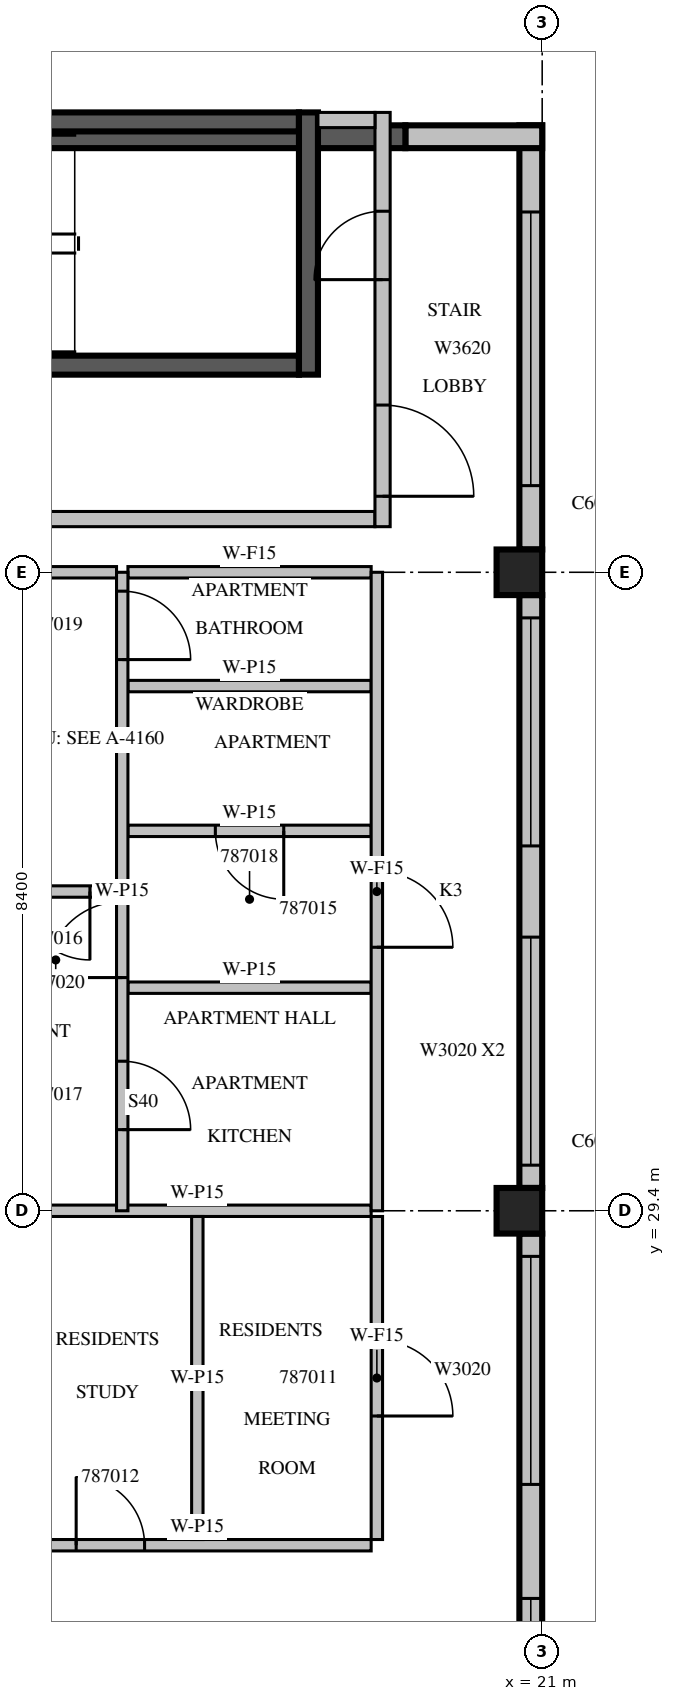
"""IFC4 building model, lengths in metres.
Left out: names, types, materials, properties, quantities, classifications, styles, units other than length and angle.
Written with IfcOpenShell. Run it as: python <this file> out.ifc"""

import sys

from ifc_helpers import new_model, si_unit, direction, frame, frame_2d, origin, origin_2d, place, context, subcontext, project, spatial, rectangle, extrude, source, transform, mapped, element, fill, save


model = new_model("IFC4")
c1 = context("Model", 3, precision=1e-05, world=origin(), true_north=direction((0.0, 1.0)))
c2 = subcontext(c1, "Body", "Model", "MODEL_VIEW")
j1 = project(units=[si_unit("LENGTHUNIT", "METRE"), si_unit("PLANEANGLEUNIT", "RADIAN")], contexts=[c1])
p1 = place(None, origin())
s1 = spatial("IfcSite", under=j1, at=p1, CompositionType="ELEMENT")
p2 = place(p1, origin())
s2 = spatial("IfcBuilding", under=s1, at=p2, CompositionType="ELEMENT")
p3 = place(p2, frame((0.0, 0.0, 365.0)))
s3 = spatial("IfcBuildingStorey", under=s2, at=p3, CompositionType="ELEMENT", Elevation=365.0)
m1 = source(origin(), c2, "Body", "SweptSolid", [
    extrude(rectangle(XDim=0.6, YDim=0.6, at=origin_2d()), origin(), (0.0, 0.0, 1.0), 3.5),
])
for number, where, z_axis, x_axis in (
    (1, (20.7, 29.4, 0.0), (0.0, 0.0, 1.0), (1.0, 0.0, 0.0)),
    (2, (20.7, 37.8, 0.0), (0.0, 0.0, 1.0), (1.0, 0.0, 0.0)),
):
    element("IfcColumn", number, at=place(p3, frame(where, z_axis=z_axis, x_axis=x_axis)), inside=s3, PredefinedType="COLUMN", context=c2, shape_type="MappedRepresentation", body=[
        mapped(m1, transform((0.0, 0.0, 0.0), scale=1.0)),
    ])
m2 = source(origin(), c2, "Body", "SweptSolid", [
    extrude(rectangle(XDim=7.5, YDim=0.3, at=frame_2d((3.75, 0.0))), origin(), (0.0, 0.0, 1.0), 3.05),
])
p4 = place(p3, frame((20.85, 21.6, 0.0), z_axis=(0.0, 0.0, 1.0), x_axis=(0.0, 1.0, 0.0)))
e3 = element("IfcWall", 3, at=p4, inside=s3, PredefinedType="STANDARD", context=c2, shape_type="MappedRepresentation", body=[
    mapped(m2, transform((0.0, 0.0, 0.0), scale=1.0)),
])
m3 = source(origin(), c2, "Body", "SweptSolid", [
    extrude(rectangle(XDim=2.4, YDim=2.0, at=frame_2d((1.2, 1.0))), frame((0.0, 0.16, 0.0), z_axis=(0.0, -1.0, 0.0), x_axis=(1.0, 0.0, 0.0)), (0.0, 0.0, 1.0), 0.32),
])
p5 = place(p4, frame((0.3, 0.0, 0.6)))
e4 = element("IfcOpeningElement", 4, at=p5, cuts=e3, PredefinedType="OPENING", context=c2, shape_type="MappedRepresentation", body=[
    mapped(m3, transform((0.0, 0.0, 0.0), scale=1.0)),
])
m4 = source(origin(), c2, "Body", "SweptSolid", [
    extrude(rectangle(XDim=3.0, YDim=2.0, at=frame_2d((1.5, 1.0))), frame((0.0, 0.16, 0.0), z_axis=(0.0, -1.0, 0.0), x_axis=(1.0, 0.0, 0.0)), (0.0, 0.0, 1.0), 0.32),
])
p6 = place(p4, frame((4.2, 0.0, 0.6)))
e5 = element("IfcOpeningElement", 5, at=p6, cuts=e3, PredefinedType="OPENING", context=c2, shape_type="MappedRepresentation", body=[
    mapped(m4, transform((0.0, 0.0, 0.0), scale=1.0)),
])
m5 = source(origin(), c2, "Body", "SweptSolid", [
    extrude(rectangle(XDim=7.8, YDim=0.3, at=frame_2d((3.9, 0.0))), origin(), (0.0, 0.0, 1.0), 3.05),
])
p7 = place(p3, frame((20.85, 29.7, 0.0), z_axis=(0.0, 0.0, 1.0), x_axis=(0.0, 1.0, 0.0)))
e6 = element("IfcWall", 6, at=p7, inside=s3, PredefinedType="STANDARD", context=c2, shape_type="MappedRepresentation", body=[
    mapped(m5, transform((0.0, 0.0, 0.0), scale=1.0)),
])
p8 = place(p7, frame((0.3, 0.0, 0.6)))
e7 = element("IfcOpeningElement", 7, at=p8, cuts=e6, PredefinedType="OPENING", context=c2, shape_type="MappedRepresentation", body=[
    mapped(m4, transform((0.0, 0.0, 0.0), scale=1.0)),
])
p9 = place(p7, frame((4.5, 0.0, 0.6)))
e8 = element("IfcOpeningElement", 8, at=p9, cuts=e6, PredefinedType="OPENING", context=c2, shape_type="MappedRepresentation", body=[
    mapped(m4, transform((0.0, 0.0, 0.0), scale=1.0)),
])
p10 = place(p3, frame((20.85, 38.1, 0.0), z_axis=(0.0, 0.0, 1.0), x_axis=(0.0, 1.0, 0.0)))
e9 = element("IfcWall", 9, at=p10, inside=s3, PredefinedType="STANDARD", context=c2, shape_type="SweptSolid", body=[
    extrude(rectangle(XDim=5.58, YDim=0.3, at=frame_2d((2.79, 0.0))), origin(), (0.0, 0.0, 1.0), 3.05),
])
m6 = source(origin(), c2, "Body", "SweptSolid", [
    extrude(rectangle(XDim=3.6, YDim=2.0, at=frame_2d((1.8, 1.0))), frame((0.0, 0.16, 0.0), z_axis=(0.0, -1.0, 0.0), x_axis=(1.0, 0.0, 0.0)), (0.0, 0.0, 1.0), 0.32),
])
p11 = place(p10, frame((0.84, 0.0, 0.6)))
e10 = element("IfcOpeningElement", 10, at=p11, cuts=e9, PredefinedType="OPENING", context=c2, shape_type="MappedRepresentation", body=[
    mapped(m6, transform((0.0, 0.0, 0.0), scale=1.0)),
])
p12 = place(p3, frame((21.0, 43.53, 0.0), z_axis=(0.0, 0.0, 1.0), x_axis=(-1.0, 0.0, 0.0)))
e11 = element("IfcWall", 11, at=p12, inside=s3, PredefinedType="STANDARD", context=c2, shape_type="SweptSolid", body=[
    extrude(rectangle(XDim=1.8, YDim=0.3, at=frame_2d((0.9, 0.0))), origin(), (0.0, 0.0, 1.0), 3.05),
])
p13 = place(p3, frame((19.2, 43.53, 0.0), z_axis=(0.0, 0.0, 1.0), x_axis=(-1.0, 0.0, 0.0)))
e12 = element("IfcWall", 12, at=p13, inside=s3, PredefinedType="SOLIDWALL", context=c2, shape_type="SweptSolid", body=[
    extrude(rectangle(XDim=8.6, YDim=0.3, at=frame_2d((4.3, 0.0))), origin(), (0.0, 0.0, 1.0), 3.05),
])
m7 = source(origin(), c2, "Body", "SweptSolid", [
    extrude(rectangle(XDim=7.0, YDim=0.25, at=frame_2d((3.5, 0.0))), origin(), (0.0, 0.0, 1.0), 3.05),
])
p14 = place(p3, frame((10.8, 40.525, 0.0), z_axis=(0.0, 0.0, 1.0), x_axis=(1.0, 0.0, 0.0)))
e13 = element("IfcWall", 13, at=p14, inside=s3, PredefinedType="SOLIDWALL", context=c2, shape_type="MappedRepresentation", body=[
    mapped(m7, transform((0.0, 0.0, 0.0), scale=1.0)),
])
m8 = source(origin(), c2, "Body", "SweptSolid", [
    extrude(rectangle(XDim=1.1, YDim=2.1, at=frame_2d((0.55, 1.05))), frame((0.0, 0.135, 0.0), z_axis=(0.0, -1.0, 0.0), x_axis=(1.0, 0.0, 0.0)), (0.0, 0.0, 1.0), 0.27),
])
p15 = place(p14, frame((0.55, 0.0, 0.0)))
e14 = element("IfcOpeningElement", 14, at=p15, cuts=e13, PredefinedType="OPENING", context=c2, shape_type="MappedRepresentation", body=[
    mapped(m8, transform((0.0, 0.0, 0.0), scale=1.0)),
])
p16 = place(p3, frame((10.8, 43.725, 0.0), z_axis=(0.0, 0.0, 1.0), x_axis=(1.0, 0.0, 0.0)))
e15 = element("IfcWall", 15, at=p16, inside=s3, PredefinedType="SOLIDWALL", context=c2, shape_type="MappedRepresentation", body=[
    mapped(m7, transform((0.0, 0.0, 0.0), scale=1.0)),
])
m9 = source(origin(), c2, "Body", "SweptSolid", [
    extrude(rectangle(XDim=3.45, YDim=0.25, at=frame_2d((1.725, 0.0))), origin(), (0.0, 0.0, 1.0), 3.05),
])
p17 = place(p3, frame((17.925, 40.4, 0.0), z_axis=(0.0, 0.0, 1.0), x_axis=(0.0, 1.0, 0.0)))
e16 = element("IfcWall", 16, at=p17, inside=s3, PredefinedType="SOLIDWALL", context=c2, shape_type="MappedRepresentation", body=[
    mapped(m9, transform((0.0, 0.0, 0.0), scale=1.0)),
])
m10 = source(origin(), c2, "Body", "SweptSolid", [
    extrude(rectangle(XDim=8.0, YDim=0.2, at=frame_2d((4.0, 0.0))), origin(), (0.0, 0.0, 1.0), 3.05),
])
p18 = place(p3, frame((10.8, 38.5, 0.0), z_axis=(0.0, 0.0, 1.0), x_axis=(1.0, 0.0, 0.0)))
e17 = element("IfcWall", 17, at=p18, inside=s3, PredefinedType="PARTITIONING", context=c2, shape_type="MappedRepresentation", body=[
    mapped(m10, transform((0.0, 0.0, 0.0), scale=1.0)),
])
m11 = source(origin(), c2, "Body", "SweptSolid", [
    extrude(rectangle(XDim=5.45, YDim=0.2, at=frame_2d((2.725, 0.0))), origin(), (0.0, 0.0, 1.0), 3.05),
])
p19 = place(p3, frame((18.9, 38.4, 0.0), z_axis=(0.0, 0.0, 1.0), x_axis=(0.0, 1.0, 0.0)))
e18 = element("IfcWall", 18, at=p19, inside=s3, PredefinedType="PARTITIONING", context=c2, shape_type="MappedRepresentation", body=[
    mapped(m11, transform((0.0, 0.0, 0.0), scale=1.0)),
])
m12 = source(origin(), c2, "Body", "SweptSolid", [
    extrude(rectangle(XDim=1.2, YDim=2.1, at=frame_2d((0.6, 1.05))), frame((0.0, 0.11, 0.0), z_axis=(0.0, -1.0, 0.0), x_axis=(1.0, 0.0, 0.0)), (0.0, 0.0, 1.0), 0.22),
])
p20 = place(p19, frame((0.4, 0.0, 0.0)))
e19 = element("IfcOpeningElement", 19, at=p20, cuts=e18, PredefinedType="OPENING", context=c2, shape_type="MappedRepresentation", body=[
    mapped(m12, transform((0.0, 0.0, 0.0), scale=1.0)),
])
m13 = source(origin(), c2, "Body", "SweptSolid", [
    extrude(rectangle(XDim=0.9, YDim=2.1, at=frame_2d((0.45, 1.05))), frame((0.0, 0.11, 0.0), z_axis=(0.0, -1.0, 0.0), x_axis=(1.0, 0.0, 0.0)), (0.0, 0.0, 1.0), 0.22),
])
p21 = place(p19, frame((3.25, 0.0, 0.0)))
e20 = element("IfcOpeningElement", 20, at=p21, cuts=e18, PredefinedType="OPENING", context=c2, shape_type="MappedRepresentation", body=[
    mapped(m13, transform((0.0, 0.0, 0.0), scale=1.0)),
])
m14 = source(origin(), c2, "Body", "SweptSolid", [
    extrude(rectangle(XDim=0.75, YDim=0.2, at=frame_2d((0.375, 0.0))), origin(), (0.0, 0.0, 1.0), 3.05),
])
p22 = place(p3, frame((18.05, 43.75, 0.0), z_axis=(0.0, 0.0, 1.0), x_axis=(1.0, 0.0, 0.0)))
e21 = element("IfcWall", 21, at=p22, inside=s3, PredefinedType="PARTITIONING", context=c2, shape_type="MappedRepresentation", body=[
    mapped(m14, transform((0.0, 0.0, 0.0), scale=1.0)),
])
m15 = source(origin(), c2, "Body", "SweptSolid", [
    extrude(rectangle(XDim=4.575, YDim=0.15, at=frame_2d((2.288, 0.0))), origin(), (0.0, 0.0, 1.0), 3.05),
])
p23 = place(p3, frame((14.175, 25.0, 0.0), z_axis=(0.0, 0.0, 1.0), x_axis=(1.0, 0.0, 0.0)))
e22 = element("IfcWall", 22, at=p23, inside=s3, PredefinedType="PARTITIONING", context=c2, shape_type="MappedRepresentation", body=[
    mapped(m15, transform((0.0, 0.0, 0.0), scale=1.0)),
])
m16 = source(origin(), c2, "Body", "SweptSolid", [
    extrude(rectangle(XDim=0.9, YDim=2.1, at=frame_2d((0.45, 1.05))), frame((0.0, 0.085, 0.0), z_axis=(0.0, -1.0, 0.0), x_axis=(1.0, 0.0, 0.0)), (0.0, 0.0, 1.0), 0.17),
])
p24 = place(p23, frame((0.694, 0.0, 0.0)))
e23 = element("IfcOpeningElement", 23, at=p24, cuts=e22, PredefinedType="OPENING", context=c2, shape_type="MappedRepresentation", body=[
    mapped(m16, transform((0.0, 0.0, 0.0), scale=1.0)),
])
p25 = place(p3, frame((18.75, 29.4, 0.0), z_axis=(0.0, 0.0, 1.0), x_axis=(-1.0, 0.0, 0.0)))
e24 = element("IfcWall", 24, at=p25, inside=s3, PredefinedType="PARTITIONING", context=c2, shape_type="MappedRepresentation", body=[
    mapped(m15, transform((0.0, 0.0, 0.0), scale=1.0)),
])
m17 = source(origin(), c2, "Body", "SweptSolid", [
    extrude(rectangle(XDim=4.25, YDim=0.15, at=frame_2d((2.125, 0.0))), origin(), (0.0, 0.0, 1.0), 3.05),
])
p26 = place(p3, frame((18.825, 25.075, 0.0), z_axis=(0.0, 0.0, 1.0), x_axis=(0.0, 1.0, 0.0)))
e25 = element("IfcWall", 25, at=p26, inside=s3, PredefinedType="PARTITIONING", context=c2, shape_type="MappedRepresentation", body=[
    mapped(m17, transform((0.0, 0.0, 0.0), scale=1.0)),
])
m18 = source(origin(), c2, "Body", "SweptSolid", [
    extrude(rectangle(XDim=1.0, YDim=2.1, at=frame_2d((0.5, 1.05))), frame((0.0, 0.085, 0.0), z_axis=(0.0, -1.0, 0.0), x_axis=(1.0, 0.0, 0.0)), (0.0, 0.0, 1.0), 0.17),
])
p27 = place(p26, frame((1.625, 0.0, 0.0)))
e26 = element("IfcOpeningElement", 26, at=p27, cuts=e25, PredefinedType="OPENING", context=c2, shape_type="MappedRepresentation", body=[
    mapped(m18, transform((0.0, 0.0, 0.0), scale=1.0)),
])
p28 = place(p3, frame((16.463, 25.075, 0.0), z_axis=(0.0, 0.0, 1.0), x_axis=(0.0, 1.0, 0.0)))
e27 = element("IfcWall", 27, at=p28, inside=s3, PredefinedType="PARTITIONING", context=c2, shape_type="MappedRepresentation", body=[
    mapped(m17, transform((0.0, 0.0, 0.0), scale=1.0)),
])
p29 = place(p3, frame((15.4, 33.6, 0.0), z_axis=(0.0, 0.0, 1.0), x_axis=(-1.0, 0.0, 0.0)))
e28 = element("IfcWall", 28, at=p29, inside=s3, PredefinedType="PARTITIONING", context=c2, shape_type="SweptSolid", body=[
    extrude(rectangle(XDim=4.6, YDim=0.15, at=frame_2d((2.3, 0.0))), origin(), (0.0, 0.0, 1.0), 3.05),
])
p30 = place(p29, frame((0.35, 0.0, 0.0)))
e29 = element("IfcOpeningElement", 29, at=p30, cuts=e28, PredefinedType="OPENING", context=c2, shape_type="MappedRepresentation", body=[
    mapped(m16, transform((0.0, 0.0, 0.0), scale=1.0)),
])
m19 = source(origin(), c2, "Body", "SweptSolid", [
    extrude(rectangle(XDim=3.2, YDim=0.15, at=frame_2d((1.6, 0.0))), origin(), (0.0, 0.0, 1.0), 3.05),
])
p31 = place(p3, frame((18.75, 32.335, 0.0), z_axis=(0.0, 0.0, 1.0), x_axis=(-1.0, 0.0, 0.0)))
e30 = element("IfcWall", 30, at=p31, inside=s3, PredefinedType="PARTITIONING", context=c2, shape_type="MappedRepresentation", body=[
    mapped(m19, transform((0.0, 0.0, 0.0), scale=1.0)),
])
p32 = place(p3, frame((18.75, 34.398, 0.0), z_axis=(0.0, 0.0, 1.0), x_axis=(-1.0, 0.0, 0.0)))
e31 = element("IfcWall", 31, at=p32, inside=s3, PredefinedType="PARTITIONING", context=c2, shape_type="MappedRepresentation", body=[
    mapped(m19, transform((0.0, 0.0, 0.0), scale=1.0)),
])
p33 = place(p32, frame((1.15, 0.0, 0.0)))
e32 = element("IfcOpeningElement", 32, at=p33, cuts=e31, PredefinedType="OPENING", context=c2, shape_type="MappedRepresentation", body=[
    mapped(m16, transform((0.0, 0.0, 0.0), scale=1.0)),
])
p34 = place(p3, frame((18.75, 36.303, 0.0), z_axis=(0.0, 0.0, 1.0), x_axis=(-1.0, 0.0, 0.0)))
e33 = element("IfcWall", 33, at=p34, inside=s3, PredefinedType="PARTITIONING", context=c2, shape_type="MappedRepresentation", body=[
    mapped(m19, transform((0.0, 0.0, 0.0), scale=1.0)),
])
m20 = source(origin(), c2, "Body", "SweptSolid", [
    extrude(rectangle(XDim=4.301, YDim=0.15, at=frame_2d((2.151, 0.0))), origin(), (0.0, 0.0, 1.0), 3.05),
])
p35 = place(p3, frame((15.4, 37.8, 0.0), z_axis=(0.0, 0.0, 1.0), x_axis=(-1.0, 0.0, 0.0)))
e34 = element("IfcWall", 34, at=p35, inside=s3, PredefinedType="PARTITIONING", context=c2, shape_type="MappedRepresentation", body=[
    mapped(m20, transform((0.0, 0.0, 0.0), scale=1.0)),
])
p36 = place(p3, frame((18.75, 37.8, 0.0), z_axis=(0.0, 0.0, 1.0), x_axis=(-1.0, 0.0, 0.0)))
e35 = element("IfcWall", 35, at=p36, inside=s3, PredefinedType="PARTITIONING", context=c2, shape_type="MappedRepresentation", body=[
    mapped(m19, transform((0.0, 0.0, 0.0), scale=1.0)),
])
m21 = source(origin(), c2, "Body", "SweptSolid", [
    extrude(rectangle(XDim=8.4, YDim=0.15, at=frame_2d((4.2, 0.0))), origin(), (0.0, 0.0, 1.0), 3.05),
])
p37 = place(p3, frame((15.475, 29.4, 0.0), z_axis=(0.0, 0.0, 1.0), x_axis=(0.0, 1.0, 0.0)))
e36 = element("IfcWall", 36, at=p37, inside=s3, PredefinedType="PARTITIONING", context=c2, shape_type="MappedRepresentation", body=[
    mapped(m21, transform((0.0, 0.0, 0.0), scale=1.0)),
])
p38 = place(p37, frame((3.068, 0.0, 0.0)))
e37 = element("IfcOpeningElement", 37, at=p38, cuts=e36, PredefinedType="OPENING", context=c2, shape_type="MappedRepresentation", body=[
    mapped(m18, transform((0.0, 0.0, 0.0), scale=1.0)),
])
p39 = place(p37, frame((1.067, 0.0, 0.0)))
e38 = element("IfcOpeningElement", 38, at=p39, cuts=e36, PredefinedType="OPENING", context=c2, shape_type="MappedRepresentation", body=[
    mapped(m16, transform((0.0, 0.0, 0.0), scale=1.0)),
])
p40 = place(p37, frame((7.252, 0.0, 0.0)))
e39 = element("IfcOpeningElement", 39, at=p40, cuts=e36, PredefinedType="OPENING", context=c2, shape_type="MappedRepresentation", body=[
    mapped(m16, transform((0.0, 0.0, 0.0), scale=1.0)),
])
p41 = place(p3, frame((18.825, 29.4, 0.0), z_axis=(0.0, 0.0, 1.0), x_axis=(0.0, 1.0, 0.0)))
e40 = element("IfcWall", 40, at=p41, inside=s3, PredefinedType="PARTITIONING", context=c2, shape_type="MappedRepresentation", body=[
    mapped(m21, transform((0.0, 0.0, 0.0), scale=1.0)),
])
p42 = place(p41, frame((3.467, 0.0, 0.0)))
e41 = element("IfcOpeningElement", 41, at=p42, cuts=e40, PredefinedType="OPENING", context=c2, shape_type="MappedRepresentation", body=[
    mapped(m18, transform((0.0, 0.0, 0.0), scale=1.0)),
])
m22 = source(origin(), c2, "Body", "SweptSolid", [
    extrude(rectangle(XDim=2.4, YDim=2.0, at=frame_2d((1.2, 1.0))), frame((0.0, 0.03, 0.0), z_axis=(0.0, -1.0, 0.0), x_axis=(1.0, 0.0, 0.0)), (0.0, 0.0, 1.0), 0.06),
])
p43 = place(p5, origin())
e42 = element("IfcWindow", 42, at=p43, inside=s3, PartitioningType="SINGLE_PANEL", PredefinedType="WINDOW", context=c2, shape_type="MappedRepresentation", body=[
    mapped(m22, transform((0.0, 0.0, 0.0), scale=1.0)),
])
fill(e4, e42)
m23 = source(origin(), c2, "Body", "SweptSolid", [
    extrude(rectangle(XDim=3.0, YDim=2.0, at=frame_2d((1.5, 1.0))), frame((0.0, 0.03, 0.0), z_axis=(0.0, -1.0, 0.0), x_axis=(1.0, 0.0, 0.0)), (0.0, 0.0, 1.0), 0.06),
])
p44 = place(p6, origin())
e43 = element("IfcWindow", 43, at=p44, inside=s3, PartitioningType="SINGLE_PANEL", PredefinedType="WINDOW", context=c2, shape_type="MappedRepresentation", body=[
    mapped(m23, transform((0.0, 0.0, 0.0), scale=1.0)),
])
fill(e5, e43)
p45 = place(p8, origin())
e44 = element("IfcWindow", 44, at=p45, inside=s3, PartitioningType="SINGLE_PANEL", PredefinedType="WINDOW", context=c2, shape_type="MappedRepresentation", body=[
    mapped(m23, transform((0.0, 0.0, 0.0), scale=1.0)),
])
fill(e7, e44)
p46 = place(p9, origin())
e45 = element("IfcWindow", 45, at=p46, inside=s3, PartitioningType="SINGLE_PANEL", PredefinedType="WINDOW", context=c2, shape_type="MappedRepresentation", body=[
    mapped(m23, transform((0.0, 0.0, 0.0), scale=1.0)),
])
fill(e8, e45)
m24 = source(origin(), c2, "Body", "SweptSolid", [
    extrude(rectangle(XDim=3.6, YDim=2.0, at=frame_2d((1.8, 1.0))), frame((0.0, 0.03, 0.0), z_axis=(0.0, -1.0, 0.0), x_axis=(1.0, 0.0, 0.0)), (0.0, 0.0, 1.0), 0.06),
])
p47 = place(p11, origin())
e46 = element("IfcWindow", 46, at=p47, inside=s3, PartitioningType="SINGLE_PANEL", PredefinedType="WINDOW", context=c2, shape_type="MappedRepresentation", body=[
    mapped(m24, transform((0.0, 0.0, 0.0), scale=1.0)),
])
fill(e10, e46)
m25 = source(origin(), c2, "Body", "SweptSolid", [
    extrude(rectangle(XDim=1.2, YDim=2.1, at=frame_2d((0.6, 1.05))), frame((0.0, 0.025, 0.0), z_axis=(0.0, -1.0, 0.0), x_axis=(1.0, 0.0, 0.0)), (0.0, 0.0, 1.0), 0.05),
])
p48 = place(p20, origin())
e47 = element("IfcDoor", 47, at=p48, inside=s3, OperationType="SINGLE_SWING_RIGHT", PredefinedType="DOOR", context=c2, shape_type="MappedRepresentation", body=[
    mapped(m25, transform((0.0, 0.0, 0.0), scale=1.0)),
])
fill(e19, e47)
m26 = source(origin(), c2, "Body", "SweptSolid", [
    extrude(rectangle(XDim=0.9, YDim=2.1, at=frame_2d((0.45, 1.05))), frame((0.0, 0.025, 0.0), z_axis=(0.0, -1.0, 0.0), x_axis=(1.0, 0.0, 0.0)), (0.0, 0.0, 1.0), 0.05),
])
p49 = place(p21, origin())
e48 = element("IfcDoor", 48, at=p49, inside=s3, OperationType="SINGLE_SWING_LEFT", PredefinedType="DOOR", context=c2, shape_type="MappedRepresentation", body=[
    mapped(m26, transform((0.0, 0.0, 0.0), scale=1.0)),
])
fill(e20, e48)
m27 = source(origin(), c2, "Body", "SweptSolid", [
    extrude(rectangle(XDim=1.0, YDim=2.1, at=frame_2d((0.5, 1.05))), frame((0.0, 0.025, 0.0), z_axis=(0.0, -1.0, 0.0), x_axis=(1.0, 0.0, 0.0)), (0.0, 0.0, 1.0), 0.05),
])
p50 = place(p27, origin())
e49 = element("IfcDoor", 49, at=p50, inside=s3, OperationType="SINGLE_SWING_RIGHT", PredefinedType="DOOR", context=c2, shape_type="MappedRepresentation", body=[
    mapped(m27, transform((0.0, 0.0, 0.0), scale=1.0)),
])
fill(e26, e49)
p51 = place(p24, origin())
e50 = element("IfcDoor", 50, at=p51, inside=s3, OperationType="SINGLE_SWING_LEFT", PredefinedType="DOOR", context=c2, shape_type="MappedRepresentation", body=[
    mapped(m26, transform((0.0, 0.0, 0.0), scale=1.0)),
])
fill(e23, e50)
p52 = place(p42, origin())
e51 = element("IfcDoor", 51, at=p52, inside=s3, OperationType="SINGLE_SWING_RIGHT", PredefinedType="DOOR", context=c2, shape_type="MappedRepresentation", body=[
    mapped(m27, transform((0.0, 0.0, 0.0), scale=1.0)),
])
fill(e41, e51)
p53 = place(p38, origin())
e52 = element("IfcDoor", 52, at=p53, inside=s3, OperationType="SINGLE_SWING_LEFT", PredefinedType="DOOR", context=c2, shape_type="MappedRepresentation", body=[
    mapped(m27, transform((0.0, 0.0, 0.0), scale=1.0)),
])
fill(e37, e52)
p54 = place(p39, origin())
e53 = element("IfcDoor", 53, at=p54, inside=s3, OperationType="SINGLE_SWING_RIGHT", PredefinedType="DOOR", context=c2, shape_type="MappedRepresentation", body=[
    mapped(m26, transform((0.0, 0.0, 0.0), scale=1.0)),
])
fill(e38, e53)
p55 = place(p33, origin())
e54 = element("IfcDoor", 54, at=p55, inside=s3, OperationType="SINGLE_SWING_LEFT", PredefinedType="DOOR", context=c2, shape_type="MappedRepresentation", body=[
    mapped(m26, transform((0.0, 0.0, 0.0), scale=1.0)),
])
fill(e32, e54)
p56 = place(p40, origin())
e55 = element("IfcDoor", 55, at=p56, inside=s3, OperationType="SINGLE_SWING_RIGHT", PredefinedType="DOOR", context=c2, shape_type="MappedRepresentation", body=[
    mapped(m26, transform((0.0, 0.0, 0.0), scale=1.0)),
])
fill(e39, e55)
p57 = place(p30, origin())
e56 = element("IfcDoor", 56, at=p57, inside=s3, OperationType="SINGLE_SWING_LEFT", PredefinedType="DOOR", context=c2, shape_type="MappedRepresentation", body=[
    mapped(m26, transform((0.0, 0.0, 0.0), scale=1.0)),
])
fill(e29, e56)
save(model, sys.argv[1])
